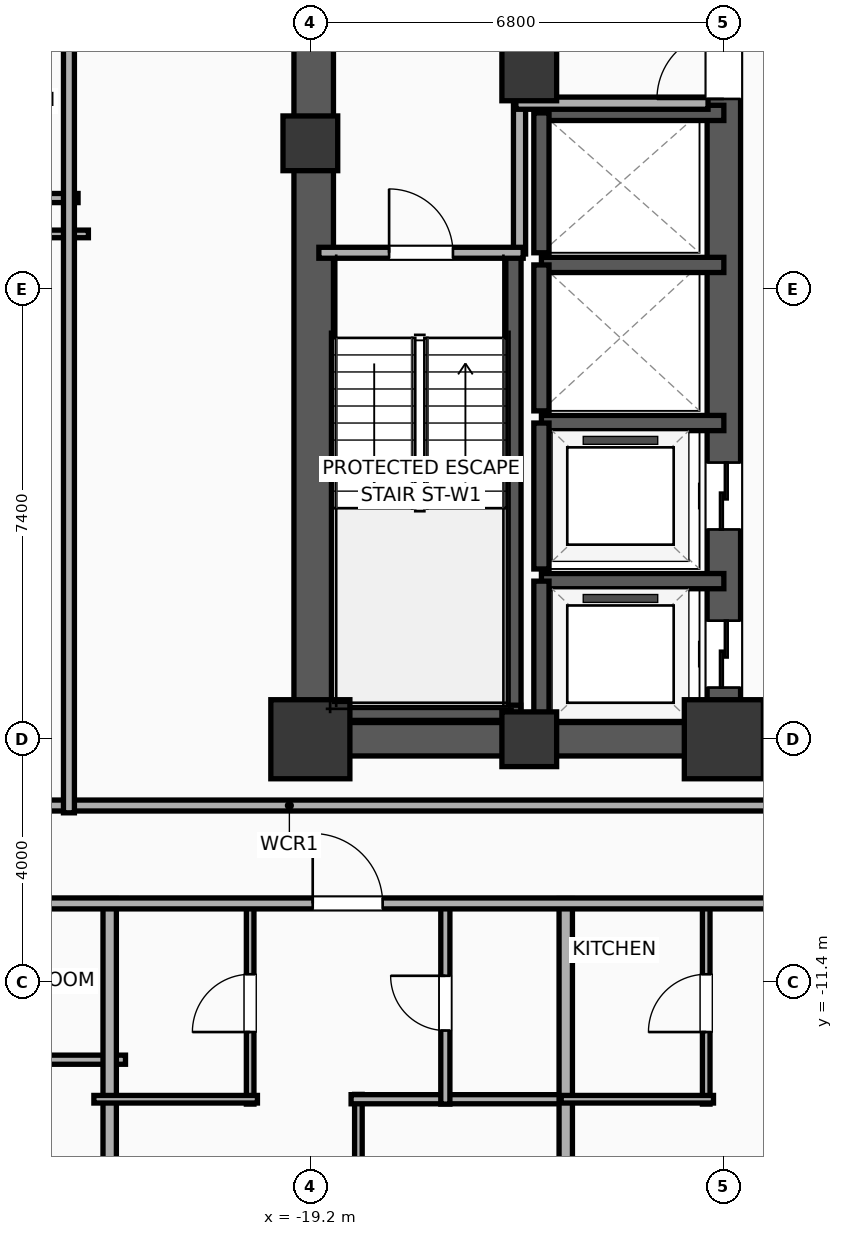
"""IFC4 building model, lengths in metres.
Left out: names, types, materials, properties, quantities, classifications, styles, units other than length and angle.
Written with IfcOpenShell. Run it as: python <this file> out.ifc"""

import sys

from ifc_helpers import new_model, si_unit, direction, frame, frame_2d, origin, origin_2d, place, context, subcontext, project, spatial, rectangle, extrude, element, fill, save


model = new_model("IFC4")
c1 = context("Model", 3, precision=1e-05, world=origin(), true_north=direction((0.0, 1.0)))
c2 = subcontext(c1, "Body", "Model", "MODEL_VIEW")
j1 = project(units=[si_unit("LENGTHUNIT", "METRE"), si_unit("PLANEANGLEUNIT", "RADIAN")], contexts=[c1])
p1 = place(None, origin())
s1 = spatial("IfcSite", under=j1, at=p1, CompositionType="ELEMENT")
p2 = place(p1, origin())
s2 = spatial("IfcBuilding", under=s1, at=p2, CompositionType="ELEMENT")
p3 = place(p2, frame((0.0, 0.0, 136.5)))
s3 = spatial("IfcBuildingStorey", under=s2, at=p3, CompositionType="ELEMENT", Elevation=136.5)
p4 = place(p3, frame((-19.2, -7.4, 0.0), z_axis=(0.0, 0.0, 1.0), x_axis=(1.0, 0.0, 0.0)))
e1 = element("IfcColumn", 1, at=p4, inside=s3, PredefinedType="COLUMN", context=c2, shape_type="SweptSolid", body=[
    extrude(rectangle(XDim=1.3, YDim=1.3, at=origin_2d()), origin(), (0.0, 0.0, 1.0), 3.9),
])
for number, where, z_axis, x_axis in (
    (2, (-19.2, 2.4, 0.0), (0.0, 0.0, 1.0), (1.0, 0.0, 0.0)),
    (3, (-15.6, -7.4, 0.0), (0.0, 0.0, 1.0), (1.0, 0.0, 0.0)),
):
    element("IfcColumn", number, at=place(p3, frame(where, z_axis=z_axis, x_axis=x_axis)), inside=s3, PredefinedType="COLUMN", context=c2, shape_type="SweptSolid", body=[
        extrude(rectangle(XDim=0.9, YDim=0.9, at=origin_2d()), origin(), (0.0, 0.0, 1.0), 3.9),
    ])
p5 = place(p3, frame((-12.4, -7.4, 0.0), z_axis=(0.0, 0.0, 1.0), x_axis=(1.0, 0.0, 0.0)))
e4 = element("IfcColumn", 4, at=p5, inside=s3, PredefinedType="COLUMN", context=c2, shape_type="SweptSolid", body=[
    extrude(rectangle(XDim=1.3, YDim=1.3, at=origin_2d()), origin(), (0.0, 0.0, 1.0), 3.9),
])
p6 = place(p3, frame((-15.6, 3.55, 0.0), z_axis=(0.0, 0.0, 1.0), x_axis=(1.0, 0.0, 0.0)))
e5 = element("IfcColumn", 5, at=p6, inside=s3, PredefinedType="COLUMN", context=c2, shape_type="SweptSolid", body=[
    extrude(rectangle(XDim=0.9, YDim=0.9, at=origin_2d()), origin(), (0.0, 0.0, 1.0), 3.9),
])
p7 = place(p3, frame((-19.475, -7.4, 0.0), z_axis=(0.0, 0.0, 1.0), x_axis=(1.0, 0.0, 0.0)))
e6 = element("IfcWall", 6, at=p7, inside=s3, PredefinedType="SHEAR", context=c2, shape_type="SweptSolid", body=[
    extrude(rectangle(XDim=7.35, YDim=0.55, at=frame_2d((3.675, 0.0))), origin(), (0.0, 0.0, 1.0), 3.5),
])
p8 = place(p3, frame((-19.145, -7.4, 0.0), z_axis=(0.0, 0.0, 1.0), x_axis=(0.0, 1.0, 0.0)))
e7 = element("IfcWall", 7, at=p8, inside=s3, PredefinedType="SHEAR", context=c2, shape_type="SweptSolid", body=[
    extrude(rectangle(XDim=14.8, YDim=0.65, at=frame_2d((7.4, 0.0))), origin(), (0.0, 0.0, 1.0), 3.5),
])
p9 = place(p3, frame((-12.4, -7.4, 0.0), z_axis=(0.0, 0.0, 1.0), x_axis=(0.0, 1.0, 0.0)))
e8 = element("IfcWall", 8, at=p9, inside=s3, PredefinedType="SHEAR", context=c2, shape_type="SweptSolid", body=[
    extrude(rectangle(XDim=14.8, YDim=0.55, at=frame_2d((7.4, 0.0))), origin(), (0.0, 0.0, 1.0), 3.5),
])
p10 = place(p9, frame((0.85, 0.0, 0.0)))
e9 = element("IfcOpeningElement", 9, at=p10, cuts=e8, PredefinedType="OPENING", context=c2, shape_type="SweptSolid", body=[
    extrude(rectangle(XDim=1.1, YDim=2.05, at=frame_2d((0.55, 1.025))), frame((0.0, 0.285, 0.0), z_axis=(0.0, -1.0, 0.0), x_axis=(1.0, 0.0, 0.0)), (0.0, 0.0, 1.0), 0.57),
])
p11 = place(p9, frame((3.45, 0.0, 0.0)))
e10 = element("IfcOpeningElement", 10, at=p11, cuts=e8, PredefinedType="OPENING", context=c2, shape_type="SweptSolid", body=[
    extrude(rectangle(XDim=1.1, YDim=2.05, at=frame_2d((0.55, 1.025))), frame((0.0, 0.285, 0.0), z_axis=(0.0, -1.0, 0.0), x_axis=(1.0, 0.0, 0.0)), (0.0, 0.0, 1.0), 0.57),
])
p12 = place(p9, frame((10.53, 0.0, 0.0)))
e11 = element("IfcOpeningElement", 11, at=p12, cuts=e8, PredefinedType="OPENING", context=c2, shape_type="SweptSolid", body=[
    extrude(rectangle(XDim=1.1, YDim=2.05, at=frame_2d((0.55, 1.025))), frame((0.0, 0.285, 0.0), z_axis=(0.0, -1.0, 0.0), x_axis=(1.0, 0.0, 0.0)), (0.0, 0.0, 1.0), 0.57),
])
p13 = place(p3, frame((-15.86, -7.085, 0.0), z_axis=(0.0, 0.0, 1.0), x_axis=(0.0, 1.0, 0.0)))
e12 = element("IfcWall", 12, at=p13, inside=s3, PredefinedType="SOLIDWALL", context=c2, shape_type="SweptSolid", body=[
    extrude(rectangle(XDim=7.685, YDim=0.25, at=frame_2d((3.843, 0.0))), origin(), (0.0, 0.0, 1.0), 3.5),
])
p14 = place(p3, frame((-19.2, -6.965, 0.0), z_axis=(0.0, 0.0, 1.0), x_axis=(1.0, 0.0, 0.0)))
e13 = element("IfcWall", 13, at=p14, inside=s3, PredefinedType="SOLIDWALL", context=c2, shape_type="SweptSolid", body=[
    extrude(rectangle(XDim=3.46, YDim=0.25, at=frame_2d((1.73, 0.0))), origin(), (0.0, 0.0, 1.0), 3.5),
])
p15 = place(p3, frame((-12.4, -4.8, 0.0), z_axis=(0.0, 0.0, 1.0), x_axis=(-1.0, 0.0, 0.0)))
e14 = element("IfcWall", 14, at=p15, inside=s3, PredefinedType="SOLIDWALL", context=c2, shape_type="SweptSolid", body=[
    extrude(rectangle(XDim=3.0, YDim=0.25, at=frame_2d((1.5, 0.0))), origin(), (0.0, 0.0, 1.0), 3.5),
])
p16 = place(p3, frame((-15.4, -4.8, 0.0), z_axis=(0.0, 0.0, 1.0), x_axis=(0.0, -1.0, 0.0)))
e15 = element("IfcWall", 15, at=p16, inside=s3, PredefinedType="SOLIDWALL", context=c2, shape_type="SweptSolid", body=[
    extrude(rectangle(XDim=2.6, YDim=0.25, at=frame_2d((1.3, 0.0))), origin(), (0.0, 0.0, 1.0), 3.5),
])
p17 = place(p3, frame((-12.4, -2.2, 0.0), z_axis=(0.0, 0.0, 1.0), x_axis=(-1.0, 0.0, 0.0)))
e16 = element("IfcWall", 16, at=p17, inside=s3, PredefinedType="SOLIDWALL", context=c2, shape_type="SweptSolid", body=[
    extrude(rectangle(XDim=3.0, YDim=0.25, at=frame_2d((1.5, 0.0))), origin(), (0.0, 0.0, 1.0), 3.5),
])
p18 = place(p3, frame((-15.4, -2.2, 0.0), z_axis=(0.0, 0.0, 1.0), x_axis=(0.0, -1.0, 0.0)))
e17 = element("IfcWall", 17, at=p18, inside=s3, PredefinedType="SOLIDWALL", context=c2, shape_type="SweptSolid", body=[
    extrude(rectangle(XDim=2.4, YDim=0.25, at=frame_2d((1.2, 0.0))), origin(), (0.0, 0.0, 1.0), 3.5),
])
p19 = place(p3, frame((-12.4, 0.4, 0.0), z_axis=(0.0, 0.0, 1.0), x_axis=(-1.0, 0.0, 0.0)))
e18 = element("IfcWall", 18, at=p19, inside=s3, PredefinedType="SOLIDWALL", context=c2, shape_type="SweptSolid", body=[
    extrude(rectangle(XDim=3.0, YDim=0.25, at=frame_2d((1.5, 0.0))), origin(), (0.0, 0.0, 1.0), 3.5),
])
p20 = place(p3, frame((-15.4, 0.4, 0.0), z_axis=(0.0, 0.0, 1.0), x_axis=(0.0, -1.0, 0.0)))
e19 = element("IfcWall", 19, at=p20, inside=s3, PredefinedType="SOLIDWALL", context=c2, shape_type="SweptSolid", body=[
    extrude(rectangle(XDim=2.4, YDim=0.25, at=frame_2d((1.2, 0.0))), origin(), (0.0, 0.0, 1.0), 3.5),
])
p21 = place(p3, frame((-12.4, 2.9, 0.0), z_axis=(0.0, 0.0, 1.0), x_axis=(-1.0, 0.0, 0.0)))
e20 = element("IfcWall", 20, at=p21, inside=s3, PredefinedType="SOLIDWALL", context=c2, shape_type="SweptSolid", body=[
    extrude(rectangle(XDim=3.0, YDim=0.25, at=frame_2d((1.5, 0.0))), origin(), (0.0, 0.0, 1.0), 3.5),
])
p22 = place(p3, frame((-15.4, 2.9, 0.0), z_axis=(0.0, 0.0, 1.0), x_axis=(0.0, -1.0, 0.0)))
e21 = element("IfcWall", 21, at=p22, inside=s3, PredefinedType="SOLIDWALL", context=c2, shape_type="SweptSolid", body=[
    extrude(rectangle(XDim=2.3, YDim=0.25, at=frame_2d((1.15, 0.0))), origin(), (0.0, 0.0, 1.0), 3.5),
])
p23 = place(p3, frame((-15.76, 0.58, 0.0), z_axis=(0.0, 0.0, 1.0), x_axis=(0.0, 1.0, 0.0)))
e22 = element("IfcWall", 22, at=p23, inside=s3, PredefinedType="PARTITIONING", context=c2, shape_type="SweptSolid", body=[
    extrude(rectangle(XDim=2.52, YDim=0.2, at=frame_2d((1.26, 0.0))), origin(), (0.0, 0.0, 1.0), 3.5),
])
p24 = place(p3, frame((-15.82, 3.06, 0.0), z_axis=(0.0, 0.0, 1.0), x_axis=(1.0, 0.0, 0.0)))
e23 = element("IfcWall", 23, at=p24, inside=s3, PredefinedType="PARTITIONING", context=c2, shape_type="SweptSolid", body=[
    extrude(rectangle(XDim=3.16, YDim=0.2, at=frame_2d((1.58, 0.0))), origin(), (0.0, 0.0, 1.0), 3.5),
])
p25 = place(p3, frame((-19.06, 0.6, 0.0), z_axis=(0.0, 0.0, 1.0), x_axis=(1.0, 0.0, 0.0)))
e24 = element("IfcWall", 24, at=p25, inside=s3, PredefinedType="PARTITIONING", context=c2, shape_type="SweptSolid", body=[
    extrude(rectangle(XDim=3.36, YDim=0.18, at=frame_2d((1.68, 0.0))), origin(), (0.0, 0.0, 1.0), 3.5),
])
p26 = place(p25, frame((1.155, 0.0, 0.0)))
e25 = element("IfcOpeningElement", 25, at=p26, cuts=e24, PredefinedType="OPENING", context=c2, shape_type="SweptSolid", body=[
    extrude(rectangle(XDim=1.05, YDim=2.05, at=frame_2d((0.525, 1.025))), frame((0.0, 0.1, 0.0), z_axis=(0.0, -1.0, 0.0), x_axis=(1.0, 0.0, 0.0)), (0.0, 0.0, 1.0), 0.2),
])
p27 = place(p3, frame((-12.15, -7.12, 0.0), z_axis=(0.0, 0.0, 1.0), x_axis=(1.0, 0.0, 0.0)))
e26 = element("IfcWall", 26, at=p27, inside=s3, PredefinedType="PARTITIONING", context=c2, shape_type="SweptSolid", body=[
    extrude(rectangle(XDim=2.27, YDim=0.18, at=frame_2d((1.135, 0.0))), origin(), (0.0, 0.0, 1.0), 2.54),
])
p28 = place(p3, frame((-29.21, -8.49, 0.0), z_axis=(0.0, 0.0, 1.0), x_axis=(1.0, 0.0, 0.0)))
e27 = element("IfcWall", 27, at=p28, inside=s3, PredefinedType="PARTITIONING", context=c2, shape_type="SweptSolid", body=[
    extrude(rectangle(XDim=19.33, YDim=0.18, at=frame_2d((9.665, 0.0))), origin(), (0.0, 0.0, 1.0), 2.39),
])
p29 = place(p3, frame((-24.884, -12.67, 0.0), z_axis=(0.0, 0.0, 1.0), x_axis=(1.0, 0.0, 0.0)))
e28 = element("IfcWall", 28, at=p29, inside=s3, PredefinedType="PLUMBINGWALL", context=c2, shape_type="SweptSolid", body=[
    extrude(rectangle(XDim=2.644, YDim=0.15, at=frame_2d((1.322, 0.0))), origin(), (0.0, 0.0, 1.0), 3.5),
])
p30 = place(p3, frame((-22.5, -20.41, 0.0), z_axis=(0.0, 0.0, 1.0), x_axis=(0.0, 1.0, 0.0)))
e29 = element("IfcWall", 29, at=p30, inside=s3, PredefinedType="PARTITIONING", context=c2, shape_type="SweptSolid", body=[
    extrude(rectangle(XDim=10.39, YDim=0.22, at=frame_2d((5.195, 0.0))), origin(), (0.0, 0.0, 1.0), 3.5),
])
p31 = place(p3, frame((-18.41, -20.56, 0.0), z_axis=(0.0, 0.0, 1.0), x_axis=(0.0, 1.0, 0.0)))
e30 = element("IfcWall", 30, at=p31, inside=s3, PredefinedType="PARTITIONING", context=c2, shape_type="SweptSolid", body=[
    extrude(rectangle(XDim=7.32, YDim=0.125, at=frame_2d((3.66, 0.0))), origin(), (0.0, 0.0, 1.0), 3.5),
])
p32 = place(p31, frame((5.113, 0.0, 0.0)))
e31 = element("IfcOpeningElement", 31, at=p32, cuts=e30, PredefinedType="OPENING", context=c2, shape_type="SweptSolid", body=[
    extrude(rectangle(XDim=0.9, YDim=2.05, at=frame_2d((0.45, 1.025))), frame((0.0, 0.073, 0.0), z_axis=(0.0, -1.0, 0.0), x_axis=(1.0, 0.0, 0.0)), (0.0, 0.0, 1.0), 0.145),
])
p33 = place(p3, frame((-18.53, -13.32, 0.0), z_axis=(0.0, 0.0, 1.0), x_axis=(1.0, 0.0, 0.0)))
e32 = element("IfcWall", 32, at=p33, inside=s3, PredefinedType="PLUMBINGWALL", context=c2, shape_type="SweptSolid", body=[
    extrude(rectangle(XDim=3.605, YDim=0.15, at=frame_2d((1.802, 0.0))), origin(), (0.0, 0.0, 1.0), 3.5),
])
p34 = place(p3, frame((-20.19, -13.4, 0.0), z_axis=(0.0, 0.0, 1.0), x_axis=(0.0, 1.0, 0.0)))
e33 = element("IfcWall", 33, at=p34, inside=s3, PredefinedType="PARTITIONING", context=c2, shape_type="SweptSolid", body=[
    extrude(rectangle(XDim=3.32, YDim=0.125, at=frame_2d((1.66, 0.0))), origin(), (0.0, 0.0, 1.0), 3.5),
])
p35 = place(p34, frame((1.185, 0.0, 0.0)))
e34 = element("IfcOpeningElement", 34, at=p35, cuts=e33, PredefinedType="OPENING", context=c2, shape_type="SweptSolid", body=[
    extrude(rectangle(XDim=0.95, YDim=2.05, at=frame_2d((0.475, 1.025))), frame((0.0, 0.073, 0.0), z_axis=(0.0, -1.0, 0.0), x_axis=(1.0, 0.0, 0.0)), (0.0, 0.0, 1.0), 0.145),
])
p36 = place(p3, frame((-22.76, -13.32, 0.0), z_axis=(0.0, 0.0, 1.0), x_axis=(1.0, 0.0, 0.0)))
e35 = element("IfcWall", 35, at=p36, inside=s3, PredefinedType="PARTITIONING", context=c2, shape_type="SweptSolid", body=[
    extrude(rectangle(XDim=2.69, YDim=0.125, at=frame_2d((1.345, 0.0))), origin(), (0.0, 0.0, 1.0), 3.5),
])
p37 = place(p3, frame((-16.98, -13.4, 0.0), z_axis=(0.0, 0.0, 1.0), x_axis=(0.0, 1.0, 0.0)))
e36 = element("IfcWall", 36, at=p37, inside=s3, PredefinedType="PLUMBINGWALL", context=c2, shape_type="SweptSolid", body=[
    extrude(rectangle(XDim=3.32, YDim=0.15, at=frame_2d((1.66, 0.0))), origin(), (0.0, 0.0, 1.0), 3.5),
])
p38 = place(p37, frame((1.21, 0.0, 0.0)))
e37 = element("IfcOpeningElement", 37, at=p38, cuts=e36, PredefinedType="OPENING", context=c2, shape_type="SweptSolid", body=[
    extrude(rectangle(XDim=0.9, YDim=2.05, at=frame_2d((0.45, 1.025))), frame((0.0, 0.085, 0.0), z_axis=(0.0, -1.0, 0.0), x_axis=(1.0, 0.0, 0.0)), (0.0, 0.0, 1.0), 0.17),
])
p39 = place(p3, frame((-15.0, -20.41, 0.0), z_axis=(0.0, 0.0, 1.0), x_axis=(0.0, 1.0, 0.0)))
e38 = element("IfcWall", 38, at=p39, inside=s3, PredefinedType="PARTITIONING", context=c2, shape_type="SweptSolid", body=[
    extrude(rectangle(XDim=10.39, YDim=0.22, at=frame_2d((5.195, 0.0))), origin(), (0.0, 0.0, 1.0), 2.39),
])
p40 = place(p3, frame((-12.69, -13.4, 0.0), z_axis=(0.0, 0.0, 1.0), x_axis=(0.0, 1.0, 0.0)))
e39 = element("IfcWall", 39, at=p40, inside=s3, PredefinedType="PARTITIONING", context=c2, shape_type="SweptSolid", body=[
    extrude(rectangle(XDim=3.32, YDim=0.125, at=frame_2d((1.66, 0.0))), origin(), (0.0, 0.0, 1.0), 3.5),
])
p41 = place(p40, frame((1.185, 0.0, 0.0)))
e40 = element("IfcOpeningElement", 40, at=p41, cuts=e39, PredefinedType="OPENING", context=c2, shape_type="SweptSolid", body=[
    extrude(rectangle(XDim=0.95, YDim=2.05, at=frame_2d((0.475, 1.025))), frame((0.0, 0.073, 0.0), z_axis=(0.0, -1.0, 0.0), x_axis=(1.0, 0.0, 0.0)), (0.0, 0.0, 1.0), 0.145),
])
p42 = place(p3, frame((-15.075, -13.32, 0.0), z_axis=(0.0, 0.0, 1.0), x_axis=(1.0, 0.0, 0.0)))
e41 = element("IfcWall", 41, at=p42, inside=s3, PredefinedType="PARTITIONING", context=c2, shape_type="SweptSolid", body=[
    extrude(rectangle(XDim=2.505, YDim=0.125, at=frame_2d((1.252, 0.0))), origin(), (0.0, 0.0, 1.0), 3.5),
])
p43 = place(p3, frame((-29.21, -10.1, 0.0), z_axis=(0.0, 0.0, 1.0), x_axis=(1.0, 0.0, 0.0)))
e42 = element("IfcWall", 42, at=p43, inside=s3, PredefinedType="PARTITIONING", context=c2, shape_type="SweptSolid", body=[
    extrude(rectangle(XDim=62.42, YDim=0.18, at=frame_2d((31.21, 0.0))), origin(), (0.0, 0.0, 1.0), 2.39),
])
p44 = place(p43, frame((3.002, 0.0, 0.0)))
e43 = element("IfcOpeningElement", 43, at=p44, cuts=e42, PredefinedType="OPENING", context=c2, shape_type="SweptSolid", body=[
    extrude(rectangle(XDim=0.9, YDim=2.05, at=frame_2d((0.45, 1.025))), frame((0.0, 0.1, 0.0), z_axis=(0.0, -1.0, 0.0), x_axis=(1.0, 0.0, 0.0)), (0.0, 0.0, 1.0), 0.2),
])
p45 = place(p43, frame((10.049, 0.0, 0.0)))
e44 = element("IfcOpeningElement", 44, at=p45, cuts=e42, PredefinedType="OPENING", context=c2, shape_type="SweptSolid", body=[
    extrude(rectangle(XDim=1.15, YDim=2.05, at=frame_2d((0.575, 1.025))), frame((0.0, 0.1, 0.0), z_axis=(0.0, -1.0, 0.0), x_axis=(1.0, 0.0, 0.0)), (0.0, 0.0, 1.0), 0.2),
])
p46 = place(p43, frame((17.552, 0.0, 0.0)))
e45 = element("IfcOpeningElement", 45, at=p46, cuts=e42, PredefinedType="OPENING", context=c2, shape_type="SweptSolid", body=[
    extrude(rectangle(XDim=1.15, YDim=2.05, at=frame_2d((0.575, 1.025))), frame((0.0, 0.1, 0.0), z_axis=(0.0, -1.0, 0.0), x_axis=(1.0, 0.0, 0.0)), (0.0, 0.0, 1.0), 0.2),
])
p47 = place(p43, frame((25.048, 0.0, 0.0)))
e46 = element("IfcOpeningElement", 46, at=p47, cuts=e42, PredefinedType="OPENING", context=c2, shape_type="SweptSolid", body=[
    extrude(rectangle(XDim=1.15, YDim=2.05, at=frame_2d((0.575, 1.025))), frame((0.0, 0.1, 0.0), z_axis=(0.0, -1.0, 0.0), x_axis=(1.0, 0.0, 0.0)), (0.0, 0.0, 1.0), 0.2),
])
p48 = place(p43, frame((32.551, 0.0, 0.0)))
e47 = element("IfcOpeningElement", 47, at=p48, cuts=e42, PredefinedType="OPENING", context=c2, shape_type="SweptSolid", body=[
    extrude(rectangle(XDim=1.15, YDim=2.05, at=frame_2d((0.575, 1.025))), frame((0.0, 0.1, 0.0), z_axis=(0.0, -1.0, 0.0), x_axis=(1.0, 0.0, 0.0)), (0.0, 0.0, 1.0), 0.2),
])
p49 = place(p43, frame((40.048, 0.0, 0.0)))
e48 = element("IfcOpeningElement", 48, at=p49, cuts=e42, PredefinedType="OPENING", context=c2, shape_type="SweptSolid", body=[
    extrude(rectangle(XDim=1.15, YDim=2.05, at=frame_2d((0.575, 1.025))), frame((0.0, 0.1, 0.0), z_axis=(0.0, -1.0, 0.0), x_axis=(1.0, 0.0, 0.0)), (0.0, 0.0, 1.0), 0.2),
])
p50 = place(p43, frame((47.551, 0.0, 0.0)))
e49 = element("IfcOpeningElement", 49, at=p50, cuts=e42, PredefinedType="OPENING", context=c2, shape_type="SweptSolid", body=[
    extrude(rectangle(XDim=1.15, YDim=2.05, at=frame_2d((0.575, 1.025))), frame((0.0, 0.1, 0.0), z_axis=(0.0, -1.0, 0.0), x_axis=(1.0, 0.0, 0.0)), (0.0, 0.0, 1.0), 0.2),
])
p51 = place(p43, frame((57.064, 0.0, 0.0)))
e50 = element("IfcOpeningElement", 50, at=p51, cuts=e42, PredefinedType="OPENING", context=c2, shape_type="SweptSolid", body=[
    extrude(rectangle(XDim=1.15, YDim=2.05, at=frame_2d((0.575, 1.025))), frame((0.0, 0.1, 0.0), z_axis=(0.0, -1.0, 0.0), x_axis=(1.0, 0.0, 0.0)), (0.0, 0.0, 1.0), 0.2),
])
p52 = place(p3, frame((-25.64, 1.5, 0.0), z_axis=(0.0, 0.0, 1.0), x_axis=(1.0, 0.0, 0.0)))
e51 = element("IfcWall", 51, at=p52, inside=s3, PredefinedType="PLUMBINGWALL", context=c2, shape_type="SweptSolid", body=[
    extrude(rectangle(XDim=2.62, YDim=0.15, at=frame_2d((1.31, 0.0))), origin(), (0.0, 0.0, 1.0), 3.5),
])
p53 = place(p3, frame((-25.229, 0.91, 0.0), z_axis=(0.0, 0.0, 1.0), x_axis=(1.0, 0.0, 0.0)))
e52 = element("IfcWall", 52, at=p53, inside=s3, PredefinedType="PARTITIONING", context=c2, shape_type="SweptSolid", body=[
    extrude(rectangle(XDim=2.378, YDim=0.125, at=frame_2d((1.189, 0.0))), origin(), (0.0, 0.0, 1.0), 3.5),
])
p54 = place(p53, frame((0.73, 0.0, 0.0)))
e53 = element("IfcOpeningElement", 53, at=p54, cuts=e52, PredefinedType="OPENING", context=c2, shape_type="SweptSolid", body=[
    extrude(rectangle(XDim=0.9, YDim=2.05, at=frame_2d((0.45, 1.025))), frame((0.0, 0.073, 0.0), z_axis=(0.0, -1.0, 0.0), x_axis=(1.0, 0.0, 0.0)), (0.0, 0.0, 1.0), 0.145),
])
p55 = place(p3, frame((-23.17, -8.61, 0.0), z_axis=(0.0, 0.0, 1.0), x_axis=(0.0, 1.0, 0.0)))
e54 = element("IfcWall", 54, at=p55, inside=s3, PredefinedType="PARTITIONING", context=c2, shape_type="SweptSolid", body=[
    extrude(rectangle(XDim=17.22, YDim=0.18, at=frame_2d((8.61, 0.0))), origin(), (0.0, 0.0, 1.0), 3.5),
])
p56 = place(p10, origin())
e55 = element("IfcDoor", 55, at=p56, inside=s3, OperationType="SLIDING_TO_LEFT", PredefinedType="DOOR", context=c2, shape_type="SweptSolid", body=[
    extrude(rectangle(XDim=1.1, YDim=2.05, at=frame_2d((0.55, 1.025))), frame((0.0, 0.025, 0.0), z_axis=(0.0, -1.0, 0.0), x_axis=(1.0, 0.0, 0.0)), (0.0, 0.0, 1.0), 0.05),
])
fill(e9, e55)
p57 = place(p11, origin())
e56 = element("IfcDoor", 56, at=p57, inside=s3, OperationType="SLIDING_TO_LEFT", PredefinedType="DOOR", context=c2, shape_type="SweptSolid", body=[
    extrude(rectangle(XDim=1.1, YDim=2.05, at=frame_2d((0.55, 1.025))), frame((0.0, 0.025, 0.0), z_axis=(0.0, -1.0, 0.0), x_axis=(1.0, 0.0, 0.0)), (0.0, 0.0, 1.0), 0.05),
])
fill(e10, e56)
p58 = place(p26, origin())
e57 = element("IfcDoor", 57, at=p58, inside=s3, OperationType="SINGLE_SWING_LEFT", PredefinedType="DOOR", context=c2, shape_type="SweptSolid", body=[
    extrude(rectangle(XDim=1.05, YDim=2.05, at=frame_2d((0.525, 1.025))), frame((0.0, 0.025, 0.0), z_axis=(0.0, -1.0, 0.0), x_axis=(1.0, 0.0, 0.0)), (0.0, 0.0, 1.0), 0.05),
])
fill(e25, e57)
p59 = place(p35, origin())
e58 = element("IfcDoor", 58, at=p59, inside=s3, OperationType="SINGLE_SWING_LEFT", PredefinedType="DOOR", context=c2, shape_type="SweptSolid", body=[
    extrude(rectangle(XDim=0.95, YDim=2.05, at=frame_2d((0.475, 1.025))), frame((0.0, 0.025, 0.0), z_axis=(0.0, -1.0, 0.0), x_axis=(1.0, 0.0, 0.0)), (0.0, 0.0, 1.0), 0.05),
])
fill(e34, e58)
p60 = place(p38, origin())
e59 = element("IfcDoor", 59, at=p60, inside=s3, OperationType="SINGLE_SWING_RIGHT", PredefinedType="DOOR", context=c2, shape_type="SweptSolid", body=[
    extrude(rectangle(XDim=0.9, YDim=2.05, at=frame_2d((0.45, 1.025))), frame((0.0, 0.025, 0.0), z_axis=(0.0, -1.0, 0.0), x_axis=(1.0, 0.0, 0.0)), (0.0, 0.0, 1.0), 0.05),
])
fill(e37, e59)
p61 = place(p41, origin())
e60 = element("IfcDoor", 60, at=p61, inside=s3, OperationType="SINGLE_SWING_LEFT", PredefinedType="DOOR", context=c2, shape_type="SweptSolid", body=[
    extrude(rectangle(XDim=0.95, YDim=2.05, at=frame_2d((0.475, 1.025))), frame((0.0, 0.025, 0.0), z_axis=(0.0, -1.0, 0.0), x_axis=(1.0, 0.0, 0.0)), (0.0, 0.0, 1.0), 0.05),
])
fill(e40, e60)
p62 = place(p45, origin())
e61 = element("IfcDoor", 61, at=p62, inside=s3, OperationType="SINGLE_SWING_LEFT", PredefinedType="DOOR", context=c2, shape_type="SweptSolid", body=[
    extrude(rectangle(XDim=1.15, YDim=2.05, at=frame_2d((0.575, 1.025))), frame((0.0, 0.025, 0.0), z_axis=(0.0, -1.0, 0.0), x_axis=(1.0, 0.0, 0.0)), (0.0, 0.0, 1.0), 0.05),
])
fill(e44, e61)
p63 = place(p12, origin())
e62 = element("IfcDoor", 62, at=p63, inside=s3, OperationType="SINGLE_SWING_LEFT", PredefinedType="DOOR", context=c2, shape_type="SweptSolid", body=[
    extrude(rectangle(XDim=1.1, YDim=2.05, at=frame_2d((0.55, 1.025))), frame((0.0, 0.025, 0.0), z_axis=(0.0, -1.0, 0.0), x_axis=(1.0, 0.0, 0.0)), (0.0, 0.0, 1.0), 0.05),
])
fill(e11, e62)
save(model, sys.argv[1])
